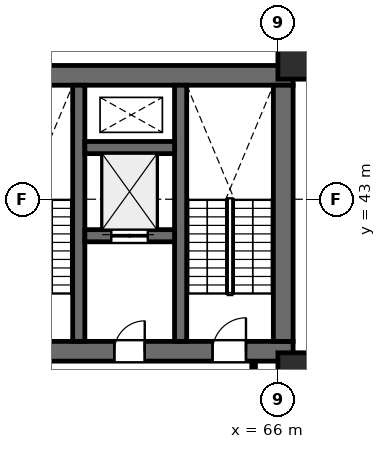
"""IFC4 building model, lengths in metres.
Left out: names, types, materials, properties, quantities, classifications, styles, units other than length and angle.
Written with IfcOpenShell. Run it as: python <this file> out.ifc"""

import sys

from ifc_helpers import new_model, si_unit, direction, frame, frame_2d, origin, origin_2d, place, context, subcontext, project, spatial, rectangle, extrude, element, fill, save


model = new_model("IFC4")
c1 = context("Model", 3, precision=1e-05, world=origin(), true_north=direction((0.0, 1.0)))
c2 = subcontext(c1, "Body", "Model", "MODEL_VIEW")
j1 = project(units=[si_unit("LENGTHUNIT", "METRE"), si_unit("PLANEANGLEUNIT", "RADIAN")], contexts=[c1])
p1 = place(None, origin())
s1 = spatial("IfcSite", under=j1, at=p1, CompositionType="ELEMENT")
p2 = place(p1, origin())
s2 = spatial("IfcBuilding", under=s1, at=p2, CompositionType="ELEMENT")
p3 = place(p2, frame((0.0, 0.0, 124.0)))
s3 = spatial("IfcBuildingStorey", under=s2, at=p3, CompositionType="ELEMENT", Elevation=124.0)
p4 = place(p3, frame((22.9, 47.075, 0.0), z_axis=(0.0, 0.0, 1.0), x_axis=(1.0, 0.0, 0.0)))
e1 = element("IfcWall", 1, at=p4, inside=s3, PredefinedType="SHEAR", context=c2, shape_type="SweptSolid", body=[
    extrude(rectangle(XDim=43.6, YDim=0.65, at=frame_2d((21.8, 0.0))), origin(), (0.0, 0.0, 1.0), 4.0),
])
p5 = place(p3, frame((55.8, 38.0, 0.0), z_axis=(0.0, 0.0, 1.0), x_axis=(1.0, 0.0, 0.0)))
e2 = element("IfcWall", 2, at=p5, inside=s3, PredefinedType="SHEAR", context=c2, shape_type="SweptSolid", body=[
    extrude(rectangle(XDim=10.7, YDim=0.65, at=frame_2d((5.35, 0.0))), origin(), (0.0, 0.0, 1.0), 4.0),
])
p6 = place(p5, frame((1.5, 0.0, 0.0)))
e3 = element("IfcOpeningElement", 3, at=p6, cuts=e2, PredefinedType="OPENING", context=c2, shape_type="SweptSolid", body=[
    extrude(rectangle(XDim=1.1, YDim=2.2, at=frame_2d((0.55, 1.1))), frame((0.0, 0.335, 0.0), z_axis=(0.0, -1.0, 0.0), x_axis=(1.0, 0.0, 0.0)), (0.0, 0.0, 1.0), 0.67),
])
p7 = place(p5, frame((4.82, 0.0, 0.0)))
e4 = element("IfcOpeningElement", 4, at=p7, cuts=e2, PredefinedType="OPENING", context=c2, shape_type="SweptSolid", body=[
    extrude(rectangle(XDim=1.0, YDim=2.15, at=frame_2d((0.5, 1.075))), frame((0.0, 0.335, 0.0), z_axis=(0.0, -1.0, 0.0), x_axis=(1.0, 0.0, 0.0)), (0.0, 0.0, 1.0), 0.67),
])
p8 = place(p5, frame((8.05, 0.0, 0.0)))
e5 = element("IfcOpeningElement", 5, at=p8, cuts=e2, PredefinedType="OPENING", context=c2, shape_type="SweptSolid", body=[
    extrude(rectangle(XDim=1.1, YDim=2.2, at=frame_2d((0.55, 1.1))), frame((0.0, 0.335, 0.0), z_axis=(0.0, -1.0, 0.0), x_axis=(1.0, 0.0, 0.0)), (0.0, 0.0, 1.0), 0.67),
])
p9 = place(p3, frame((66.175, 38.325, 0.0), z_axis=(0.0, 0.0, 1.0), x_axis=(0.0, 1.0, 0.0)))
e6 = element("IfcWall", 6, at=p9, inside=s3, PredefinedType="SHEAR", context=c2, shape_type="SweptSolid", body=[
    extrude(rectangle(XDim=8.425, YDim=0.65, at=frame_2d((4.212, 0.0))), origin(), (0.0, 0.0, 1.0), 4.0),
])
for number, where, z_axis, x_axis in (
    (7, (62.8, 38.325, 0.0), (0.0, 0.0, 1.0), (0.0, 1.0, 0.0)),
    (8, (59.45, 38.325, 0.0), (0.0, 0.0, 1.0), (0.0, 1.0, 0.0)),
):
    element("IfcWall", number, at=place(p3, frame(where, z_axis=z_axis, x_axis=x_axis)), inside=s3, PredefinedType="SHEAR", context=c2, shape_type="SweptSolid", body=[
        extrude(rectangle(XDim=8.425, YDim=0.4, at=frame_2d((4.212, 0.0))), origin(), (0.0, 0.0, 1.0), 4.0),
    ])
p10 = place(p3, frame((59.65, 41.8, 0.0), z_axis=(0.0, 0.0, 1.0), x_axis=(1.0, 0.0, 0.0)))
e9 = element("IfcWall", 9, at=p10, inside=s3, PredefinedType="SHEAR", context=c2, shape_type="SweptSolid", body=[
    extrude(rectangle(XDim=2.95, YDim=0.4, at=frame_2d((1.475, 0.0))), origin(), (0.0, 0.0, 1.0), 4.0),
])
p11 = place(p10, frame((0.87, 0.0, 0.0)))
e10 = element("IfcOpeningElement", 10, at=p11, cuts=e9, PredefinedType="OPENING", context=c2, shape_type="SweptSolid", body=[
    extrude(rectangle(XDim=1.2, YDim=2.2, at=frame_2d((0.6, 1.1))), frame((0.0, 0.21, 0.0), z_axis=(0.0, -1.0, 0.0), x_axis=(1.0, 0.0, 0.0)), (0.0, 0.0, 1.0), 0.42),
])
p12 = place(p3, frame((59.65, 44.7, 0.0), z_axis=(0.0, 0.0, 1.0), x_axis=(1.0, 0.0, 0.0)))
e11 = element("IfcWall", 11, at=p12, inside=s3, PredefinedType="SHEAR", context=c2, shape_type="SweptSolid", body=[
    extrude(rectangle(XDim=2.95, YDim=0.4, at=frame_2d((1.475, 0.0))), origin(), (0.0, 0.0, 1.0), 4.0),
])
for number, where, z_axis, x_axis in (
    (12, (66.5, 47.55, 0.0), (0.0, 0.0, 1.0), (1.0, 0.0, 0.0)),
    (13, (66.5, 37.35, 0.0), (0.0, 0.0, 1.0), (1.0, 0.0, 0.0)),
):
    element("IfcColumn", number, at=place(p3, frame(where, z_axis=z_axis, x_axis=x_axis)), inside=s3, PredefinedType="COLUMN", context=c2, shape_type="SweptSolid", body=[
        extrude(rectangle(XDim=1.0, YDim=1.2, at=origin_2d()), origin(), (0.0, 0.0, 1.0), 4.0),
    ])
p13 = place(p3, frame((68.375, 37.8, 0.0), z_axis=(0.0, 0.0, 1.0), x_axis=(-0.13917001236, -0.990268502811, 0.0)))
e14 = element("IfcWall", 14, at=p13, inside=s3, PredefinedType="STANDARD", context=c2, shape_type="SweptSolid", body=[
    extrude(rectangle(XDim=29.549, YDim=0.28, at=frame_2d((14.774, 0.0))), origin(), (0.0, 0.0, 1.0), 3.75),
])
p14 = place(p13, frame((8.238, 0.0, 0.0)))
e15 = element("IfcOpeningElement", 15, at=p14, cuts=e14, PredefinedType="OPENING", context=c2, shape_type="SweptSolid", body=[
    extrude(rectangle(XDim=1.0, YDim=2.15, at=frame_2d((0.5, 1.075))), frame((0.0, 0.15, 0.0), z_axis=(0.0, -1.0, 0.0), x_axis=(1.0, 0.0, 0.0)), (0.0, 0.0, 1.0), 0.3),
])
p15 = place(p13, frame((3.971, 0.0, 0.65)))
e16 = element("IfcOpeningElement", 16, at=p15, cuts=e14, PredefinedType="OPENING", context=c2, shape_type="SweptSolid", body=[
    extrude(rectangle(XDim=1.8, YDim=2.1, at=frame_2d((0.9, 1.05))), frame((0.0, 0.15, 0.0), z_axis=(0.0, -1.0, 0.0), x_axis=(1.0, 0.0, 0.0)), (0.0, 0.0, 1.0), 0.3),
])
p16 = place(p13, frame((18.256, 0.0, 0.65)))
e17 = element("IfcOpeningElement", 17, at=p16, cuts=e14, PredefinedType="OPENING", context=c2, shape_type="SweptSolid", body=[
    extrude(rectangle(XDim=1.8, YDim=2.1, at=frame_2d((0.9, 1.05))), frame((0.0, 0.15, 0.0), z_axis=(0.0, -1.0, 0.0), x_axis=(1.0, 0.0, 0.0)), (0.0, 0.0, 1.0), 0.3),
])
p17 = place(p3, frame((65.2, 34.4, 0.0), z_axis=(0.0, 0.0, 1.0), x_axis=(0.0, 1.0, 0.0)))
e18 = element("IfcWall", 18, at=p17, inside=s3, PredefinedType="PARTITIONING", context=c2, shape_type="SweptSolid", body=[
    extrude(rectangle(XDim=3.267, YDim=0.12, at=frame_2d((1.634, 0.0))), origin(), (0.0, 0.0, 1.0), 2.894),
])
p18 = place(p7, origin())
e19 = element("IfcDoor", 19, at=p18, inside=s3, OperationType="SINGLE_SWING_RIGHT", PredefinedType="DOOR", context=c2, shape_type="SweptSolid", body=[
    extrude(rectangle(XDim=1.0, YDim=2.15, at=frame_2d((0.5, 1.075))), frame((0.0, 0.025, 0.0), z_axis=(0.0, -1.0, 0.0), x_axis=(1.0, 0.0, 0.0)), (0.0, 0.0, 1.0), 0.05),
])
fill(e4, e19)
p19 = place(p8, origin())
e20 = element("IfcDoor", 20, at=p19, inside=s3, OperationType="SINGLE_SWING_RIGHT", PredefinedType="DOOR", context=c2, shape_type="SweptSolid", body=[
    extrude(rectangle(XDim=1.1, YDim=2.2, at=frame_2d((0.55, 1.1))), frame((0.0, 0.025, 0.0), z_axis=(0.0, -1.0, 0.0), x_axis=(1.0, 0.0, 0.0)), (0.0, 0.0, 1.0), 0.05),
])
fill(e5, e20)
p20 = place(p11, origin())
e21 = element("IfcDoor", 21, at=p20, inside=s3, OperationType="DOUBLE_DOOR_SLIDING", PredefinedType="DOOR", context=c2, shape_type="SweptSolid", body=[
    extrude(rectangle(XDim=1.2, YDim=2.2, at=frame_2d((0.6, 1.1))), frame((0.0, 0.025, 0.0), z_axis=(0.0, -1.0, 0.0), x_axis=(1.0, 0.0, 0.0)), (0.0, 0.0, 1.0), 0.05),
])
fill(e10, e21)
save(model, sys.argv[1])
